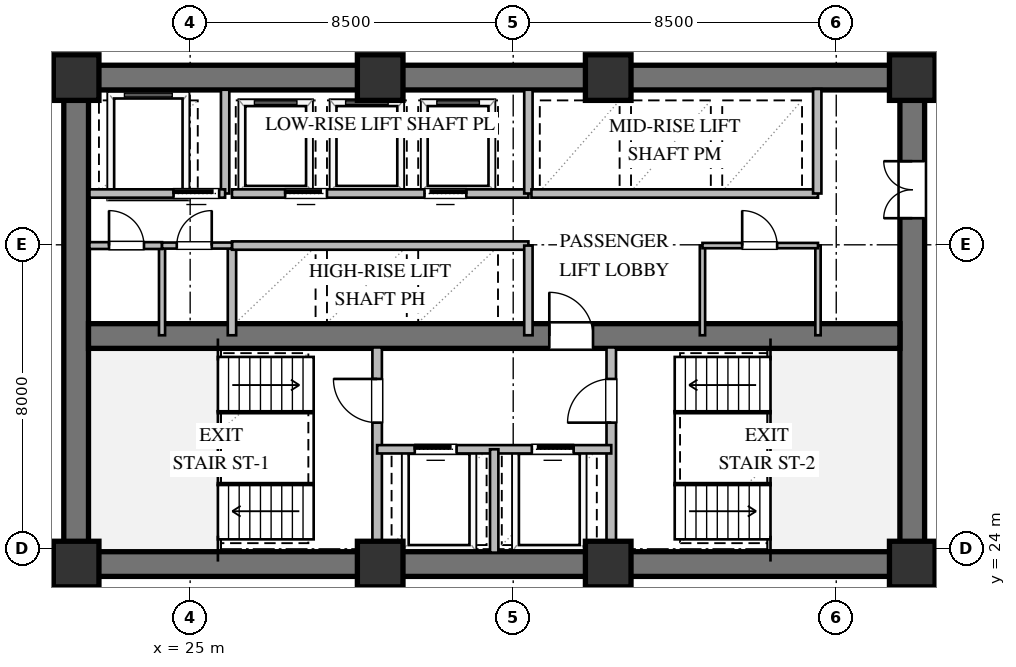
"""IFC4 building model, lengths in metres.
Left out: names, types, materials, properties, quantities, classifications, styles, units other than length and angle.
Written with IfcOpenShell. Run it as: python <this file> out.ifc"""

import sys

from ifc_helpers import new_model, si_unit, direction, frame, frame_2d, origin, origin_2d, place, context, subcontext, project, spatial, rectangle, extrude, element, fill, save


model = new_model("IFC4")
c1 = context("Model", 3, precision=1e-05, world=origin(), true_north=direction((0.0, 1.0)))
c2 = subcontext(c1, "Body", "Model", "MODEL_VIEW")
j1 = project(units=[si_unit("LENGTHUNIT", "METRE"), si_unit("PLANEANGLEUNIT", "RADIAN")], contexts=[c1])
p1 = place(None, origin())
s1 = spatial("IfcSite", under=j1, at=p1, CompositionType="ELEMENT")
p2 = place(p1, origin())
s2 = spatial("IfcBuilding", under=s1, at=p2, CompositionType="ELEMENT")
p3 = place(p2, frame((0.0, 0.0, 56.4)))
s3 = spatial("IfcBuildingStorey", under=s2, at=p3, CompositionType="ELEMENT", Elevation=56.4)
for number, where, z_axis, x_axis in (
    (1, (21.675, 23.6, 0.0), (0.0, 0.0, 1.0), (1.0, 0.0, 0.0)),
    (2, (21.675, 36.4, 0.0), (0.0, 0.0, 1.0), (1.0, 0.0, 0.0)),
):
    element("IfcWall", number, at=place(p3, frame(where, z_axis=z_axis, x_axis=x_axis)), inside=s3, PredefinedType="SHEAR", context=c2, shape_type="SweptSolid", body=[
        extrude(rectangle(XDim=22.65, YDim=0.65, at=frame_2d((11.325, 0.0))), origin(), (0.0, 0.0, 1.0), 3.36),
    ])
p4 = place(p3, frame((22.0, 23.925, 0.0), z_axis=(0.0, 0.0, 1.0), x_axis=(0.0, 1.0, 0.0)))
e3 = element("IfcWall", 3, at=p4, inside=s3, PredefinedType="SHEAR", context=c2, shape_type="SweptSolid", body=[
    extrude(rectangle(XDim=12.15, YDim=0.65, at=frame_2d((6.075, 0.0))), origin(), (0.0, 0.0, 1.0), 3.36),
])
p5 = place(p3, frame((44.0, 23.925, 0.0), z_axis=(0.0, 0.0, 1.0), x_axis=(0.0, 1.0, 0.0)))
e4 = element("IfcWall", 4, at=p5, inside=s3, PredefinedType="SHEAR", context=c2, shape_type="SweptSolid", body=[
    extrude(rectangle(XDim=12.15, YDim=0.65, at=frame_2d((6.075, 0.0))), origin(), (0.0, 0.0, 1.0), 3.36),
])
p6 = place(p5, frame((8.775, 0.0, 0.0)))
e5 = element("IfcOpeningElement", 5, at=p6, cuts=e4, PredefinedType="OPENING", context=c2, shape_type="SweptSolid", body=[
    extrude(rectangle(XDim=1.5, YDim=2.15, at=frame_2d((0.75, 1.075))), frame((0.0, 0.335, 0.0), z_axis=(0.0, -1.0, 0.0), x_axis=(1.0, 0.0, 0.0)), (0.0, 0.0, 1.0), 0.67),
])
p7 = place(p3, frame((22.325, 29.6, 0.0), z_axis=(0.0, 0.0, 1.0), x_axis=(1.0, 0.0, 0.0)))
e6 = element("IfcWall", 6, at=p7, inside=s3, PredefinedType="SHEAR", context=c2, shape_type="SweptSolid", body=[
    extrude(rectangle(XDim=21.35, YDim=0.65, at=frame_2d((10.675, 0.0))), origin(), (0.0, 0.0, 1.0), 3.36),
])
p8 = place(p7, frame((12.125, 0.0, 0.0)))
e7 = element("IfcOpeningElement", 7, at=p8, cuts=e6, PredefinedType="OPENING", context=c2, shape_type="SweptSolid", body=[
    extrude(rectangle(XDim=1.15, YDim=2.1, at=frame_2d((0.575, 1.05))), frame((0.0, 0.335, 0.0), z_axis=(0.0, -1.0, 0.0), x_axis=(1.0, 0.0, 0.0)), (0.0, 0.0, 1.0), 0.67),
])
for number, where, z_axis, x_axis in (
    (8, (22.0, 23.6, 0.0), (0.0, 0.0, 1.0), (1.0, 0.0, 0.0)),
    (9, (30.0, 23.6, 0.0), (0.0, 0.0, 1.0), (1.0, 0.0, 0.0)),
    (10, (36.0, 23.6, 0.0), (0.0, 0.0, 1.0), (1.0, 0.0, 0.0)),
    (11, (44.0, 23.6, 0.0), (0.0, 0.0, 1.0), (1.0, 0.0, 0.0)),
    (12, (44.0, 36.4, 0.0), (0.0, 0.0, 1.0), (1.0, 0.0, 0.0)),
    (13, (36.0, 36.4, 0.0), (0.0, 0.0, 1.0), (1.0, 0.0, 0.0)),
    (14, (30.0, 36.4, 0.0), (0.0, 0.0, 1.0), (1.0, 0.0, 0.0)),
    (15, (22.0, 36.4, 0.0), (0.0, 0.0, 1.0), (1.0, 0.0, 0.0)),
):
    element("IfcColumn", number, at=place(p3, frame(where, z_axis=z_axis, x_axis=x_axis)), inside=s3, PredefinedType="COLUMN", context=c2, shape_type="SweptSolid", body=[
        extrude(rectangle(XDim=1.2, YDim=1.2, at=origin_2d()), origin(), (0.0, 0.0, 1.0), 3.6),
    ])
p9 = place(p3, frame((29.92, 23.9, 0.0), z_axis=(0.0, 0.0, 1.0), x_axis=(0.0, 1.0, 0.0)))
e16 = element("IfcWall", 16, at=p9, inside=s3, PredefinedType="SOLIDWALL", context=c2, shape_type="SweptSolid", body=[
    extrude(rectangle(XDim=5.4, YDim=0.25, at=frame_2d((2.7, 0.0))), origin(), (0.0, 0.0, 1.0), 3.36),
])
p10 = place(p9, frame((3.421, 0.0, 0.0)))
e17 = element("IfcOpeningElement", 17, at=p10, cuts=e16, PredefinedType="OPENING", context=c2, shape_type="SweptSolid", body=[
    extrude(rectangle(XDim=1.15, YDim=2.1, at=frame_2d((0.575, 1.05))), frame((0.0, 0.135, 0.0), z_axis=(0.0, -1.0, 0.0), x_axis=(1.0, 0.0, 0.0)), (0.0, 0.0, 1.0), 0.27),
])
p11 = place(p3, frame((36.08, 23.9, 0.0), z_axis=(0.0, 0.0, 1.0), x_axis=(0.0, 1.0, 0.0)))
e18 = element("IfcWall", 18, at=p11, inside=s3, PredefinedType="SOLIDWALL", context=c2, shape_type="SweptSolid", body=[
    extrude(rectangle(XDim=5.4, YDim=0.25, at=frame_2d((2.7, 0.0))), origin(), (0.0, 0.0, 1.0), 3.36),
])
p12 = place(p11, frame((3.421, 0.0, 0.0)))
e19 = element("IfcOpeningElement", 19, at=p12, cuts=e18, PredefinedType="OPENING", context=c2, shape_type="SweptSolid", body=[
    extrude(rectangle(XDim=1.15, YDim=2.1, at=frame_2d((0.575, 1.05))), frame((0.0, 0.135, 0.0), z_axis=(0.0, -1.0, 0.0), x_axis=(1.0, 0.0, 0.0)), (0.0, 0.0, 1.0), 0.27),
])
p13 = place(p3, frame((29.92, 26.62, 0.0), z_axis=(0.0, 0.0, 1.0), x_axis=(1.0, 0.0, 0.0)))
e20 = element("IfcWall", 20, at=p13, inside=s3, PredefinedType="SOLIDWALL", context=c2, shape_type="SweptSolid", body=[
    extrude(rectangle(XDim=6.16, YDim=0.22, at=frame_2d((3.08, 0.0))), origin(), (0.0, 0.0, 1.0), 3.36),
])
p14 = place(p13, frame((0.99, 0.0, 0.0)))
e21 = element("IfcOpeningElement", 21, at=p14, cuts=e20, PredefinedType="OPENING", context=c2, shape_type="SweptSolid", body=[
    extrude(rectangle(XDim=1.1, YDim=2.1, at=frame_2d((0.55, 1.05))), frame((0.0, 0.12, 0.0), z_axis=(0.0, -1.0, 0.0), x_axis=(1.0, 0.0, 0.0)), (0.0, 0.0, 1.0), 0.24),
])
p15 = place(p13, frame((4.07, 0.0, 0.0)))
e22 = element("IfcOpeningElement", 22, at=p15, cuts=e20, PredefinedType="OPENING", context=c2, shape_type="SweptSolid", body=[
    extrude(rectangle(XDim=1.1, YDim=2.1, at=frame_2d((0.55, 1.05))), frame((0.0, 0.12, 0.0), z_axis=(0.0, -1.0, 0.0), x_axis=(1.0, 0.0, 0.0)), (0.0, 0.0, 1.0), 0.24),
])
p16 = place(p3, frame((33.0, 23.9, 0.0), z_axis=(0.0, 0.0, 1.0), x_axis=(0.0, 1.0, 0.0)))
e23 = element("IfcWall", 23, at=p16, inside=s3, PredefinedType="SOLIDWALL", context=c2, shape_type="SweptSolid", body=[
    extrude(rectangle(XDim=2.72, YDim=0.22, at=frame_2d((1.36, 0.0))), origin(), (0.0, 0.0, 1.0), 3.36),
])
p17 = place(p3, frame((25.92, 33.35, 0.0), z_axis=(0.0, 0.0, 1.0), x_axis=(0.0, 1.0, 0.0)))
e24 = element("IfcWall", 24, at=p17, inside=s3, PredefinedType="SOLIDWALL", context=c2, shape_type="SweptSolid", body=[
    extrude(rectangle(XDim=2.73, YDim=0.22, at=frame_2d((1.365, 0.0))), origin(), (0.0, 0.0, 1.0), 3.36),
])
p18 = place(p3, frame((22.35, 33.35, 0.0), z_axis=(0.0, 0.0, 1.0), x_axis=(1.0, 0.0, 0.0)))
e25 = element("IfcWall", 25, at=p18, inside=s3, PredefinedType="SOLIDWALL", context=c2, shape_type="SweptSolid", body=[
    extrude(rectangle(XDim=3.57, YDim=0.22, at=frame_2d((1.785, 0.0))), origin(), (0.0, 0.0, 1.0), 3.36),
])
p19 = place(p18, frame((2.213, 0.0, 0.0)))
e26 = element("IfcOpeningElement", 26, at=p19, cuts=e25, PredefinedType="OPENING", context=c2, shape_type="SweptSolid", body=[
    extrude(rectangle(XDim=1.2, YDim=2.1, at=frame_2d((0.6, 1.05))), frame((0.0, 0.12, 0.0), z_axis=(0.0, -1.0, 0.0), x_axis=(1.0, 0.0, 0.0)), (0.0, 0.0, 1.0), 0.24),
])
p20 = place(p3, frame((26.1, 29.62, 0.0), z_axis=(0.0, 0.0, 1.0), x_axis=(0.0, 1.0, 0.0)))
e27 = element("IfcWall", 27, at=p20, inside=s3, PredefinedType="SOLIDWALL", context=c2, shape_type="SweptSolid", body=[
    extrude(rectangle(XDim=2.36, YDim=0.22, at=frame_2d((1.18, 0.0))), origin(), (0.0, 0.0, 1.0), 3.36),
])
p21 = place(p3, frame((26.1, 31.98, 0.0), z_axis=(0.0, 0.0, 1.0), x_axis=(1.0, 0.0, 0.0)))
e28 = element("IfcWall", 28, at=p21, inside=s3, PredefinedType="SOLIDWALL", context=c2, shape_type="SweptSolid", body=[
    extrude(rectangle(XDim=7.8, YDim=0.22, at=frame_2d((3.9, 0.0))), origin(), (0.0, 0.0, 1.0), 3.36),
])
p22 = place(p3, frame((33.9, 29.62, 0.0), z_axis=(0.0, 0.0, 1.0), x_axis=(0.0, 1.0, 0.0)))
e29 = element("IfcWall", 29, at=p22, inside=s3, PredefinedType="SOLIDWALL", context=c2, shape_type="SweptSolid", body=[
    extrude(rectangle(XDim=2.36, YDim=0.22, at=frame_2d((1.18, 0.0))), origin(), (0.0, 0.0, 1.0), 3.36),
])
p23 = place(p3, frame((26.1, 33.35, 0.0), z_axis=(0.0, 0.0, 1.0), x_axis=(1.0, 0.0, 0.0)))
e30 = element("IfcWall", 30, at=p23, inside=s3, PredefinedType="SOLIDWALL", context=c2, shape_type="SweptSolid", body=[
    extrude(rectangle(XDim=7.8, YDim=0.22, at=frame_2d((3.9, 0.0))), origin(), (0.0, 0.0, 1.0), 3.36),
])
p24 = place(p23, frame((1.4, 0.0, 0.0)))
e31 = element("IfcOpeningElement", 31, at=p24, cuts=e30, PredefinedType="OPENING", context=c2, shape_type="SweptSolid", body=[
    extrude(rectangle(XDim=1.1, YDim=2.1, at=frame_2d((0.55, 1.05))), frame((0.0, 0.12, 0.0), z_axis=(0.0, -1.0, 0.0), x_axis=(1.0, 0.0, 0.0)), (0.0, 0.0, 1.0), 0.24),
])
p25 = place(p23, frame((5.066, 0.0, 0.0)))
e32 = element("IfcOpeningElement", 32, at=p25, cuts=e30, PredefinedType="OPENING", context=c2, shape_type="SweptSolid", body=[
    extrude(rectangle(XDim=1.1, YDim=2.1, at=frame_2d((0.55, 1.05))), frame((0.0, 0.12, 0.0), z_axis=(0.0, -1.0, 0.0), x_axis=(1.0, 0.0, 0.0)), (0.0, 0.0, 1.0), 0.24),
])
p26 = place(p3, frame((33.9, 33.35, 0.0), z_axis=(0.0, 0.0, 1.0), x_axis=(0.0, 1.0, 0.0)))
e33 = element("IfcWall", 33, at=p26, inside=s3, PredefinedType="SOLIDWALL", context=c2, shape_type="SweptSolid", body=[
    extrude(rectangle(XDim=2.73, YDim=0.22, at=frame_2d((1.365, 0.0))), origin(), (0.0, 0.0, 1.0), 3.36),
])
p27 = place(p3, frame((33.98, 33.35, 0.0), z_axis=(0.0, 0.0, 1.0), x_axis=(1.0, 0.0, 0.0)))
e34 = element("IfcWall", 34, at=p27, inside=s3, PredefinedType="SOLIDWALL", context=c2, shape_type="SweptSolid", body=[
    extrude(rectangle(XDim=7.54, YDim=0.22, at=frame_2d((3.77, 0.0))), origin(), (0.0, 0.0, 1.0), 3.36),
])
p28 = place(p3, frame((41.5, 33.35, 0.0), z_axis=(0.0, 0.0, 1.0), x_axis=(0.0, 1.0, 0.0)))
e35 = element("IfcWall", 35, at=p28, inside=s3, PredefinedType="SOLIDWALL", context=c2, shape_type="SweptSolid", body=[
    extrude(rectangle(XDim=2.75, YDim=0.22, at=frame_2d((1.375, 0.0))), origin(), (0.0, 0.0, 1.0), 3.36),
])
p29 = place(p3, frame((24.26, 29.62, 0.0), z_axis=(0.0, 0.0, 1.0), x_axis=(0.0, 1.0, 0.0)))
e36 = element("IfcWall", 36, at=p29, inside=s3, PredefinedType="PLUMBINGWALL", context=c2, shape_type="SweptSolid", body=[
    extrude(rectangle(XDim=2.36, YDim=0.16, at=frame_2d((1.18, 0.0))), origin(), (0.0, 0.0, 1.0), 3.36),
])
p30 = place(p3, frame((22.35, 31.98, 0.0), z_axis=(0.0, 0.0, 1.0), x_axis=(1.0, 0.0, 0.0)))
e37 = element("IfcWall", 37, at=p30, inside=s3, PredefinedType="PARTITIONING", context=c2, shape_type="SweptSolid", body=[
    extrude(rectangle(XDim=1.91, YDim=0.18, at=frame_2d((0.955, 0.0))), origin(), (0.0, 0.0, 1.0), 3.36),
])
p31 = place(p30, frame((0.515, 0.0, 0.0)))
e38 = element("IfcOpeningElement", 38, at=p31, cuts=e37, PredefinedType="OPENING", context=c2, shape_type="SweptSolid", body=[
    extrude(rectangle(XDim=0.92, YDim=2.1, at=frame_2d((0.46, 1.05))), frame((0.0, 0.1, 0.0), z_axis=(0.0, -1.0, 0.0), x_axis=(1.0, 0.0, 0.0)), (0.0, 0.0, 1.0), 0.2),
])
p32 = place(p3, frame((24.26, 31.98, 0.0), z_axis=(0.0, 0.0, 1.0), x_axis=(1.0, 0.0, 0.0)))
e39 = element("IfcWall", 39, at=p32, inside=s3, PredefinedType="PLUMBINGWALL", context=c2, shape_type="SweptSolid", body=[
    extrude(rectangle(XDim=1.84, YDim=0.16, at=frame_2d((0.92, 0.0))), origin(), (0.0, 0.0, 1.0), 3.36),
])
p33 = place(p32, frame((0.388, 0.0, 0.0)))
e40 = element("IfcOpeningElement", 40, at=p33, cuts=e39, PredefinedType="OPENING", context=c2, shape_type="SweptSolid", body=[
    extrude(rectangle(XDim=0.92, YDim=2.1, at=frame_2d((0.46, 1.05))), frame((0.0, 0.09, 0.0), z_axis=(0.0, -1.0, 0.0), x_axis=(1.0, 0.0, 0.0)), (0.0, 0.0, 1.0), 0.18),
])
for number, where, z_axis, x_axis in (
    (41, (38.48, 29.62, 0.0), (0.0, 0.0, 1.0), (0.0, 1.0, 0.0)),
    (42, (41.52, 29.62, 0.0), (0.0, 0.0, 1.0), (0.0, 1.0, 0.0)),
):
    element("IfcWall", number, at=place(p3, frame(where, z_axis=z_axis, x_axis=x_axis)), inside=s3, PredefinedType="PARTITIONING", context=c2, shape_type="SweptSolid", body=[
        extrude(rectangle(XDim=2.36, YDim=0.14, at=frame_2d((1.18, 0.0))), origin(), (0.0, 0.0, 1.0), 3.36),
    ])
p34 = place(p3, frame((38.48, 31.98, 0.0), z_axis=(0.0, 0.0, 1.0), x_axis=(1.0, 0.0, 0.0)))
e43 = element("IfcWall", 43, at=p34, inside=s3, PredefinedType="PARTITIONING", context=c2, shape_type="SweptSolid", body=[
    extrude(rectangle(XDim=3.04, YDim=0.14, at=frame_2d((1.52, 0.0))), origin(), (0.0, 0.0, 1.0), 3.36),
])
p35 = place(p34, frame((1.045, 0.0, 0.0)))
e44 = element("IfcOpeningElement", 44, at=p35, cuts=e43, PredefinedType="OPENING", context=c2, shape_type="SweptSolid", body=[
    extrude(rectangle(XDim=0.92, YDim=2.1, at=frame_2d((0.46, 1.05))), frame((0.0, 0.08, 0.0), z_axis=(0.0, -1.0, 0.0), x_axis=(1.0, 0.0, 0.0)), (0.0, 0.0, 1.0), 0.16),
])
p36 = place(p10, origin())
e45 = element("IfcDoor", 45, at=p36, inside=s3, OperationType="SINGLE_SWING_RIGHT", PredefinedType="DOOR", context=c2, shape_type="SweptSolid", body=[
    extrude(rectangle(XDim=1.15, YDim=2.1, at=frame_2d((0.575, 1.05))), frame((0.0, 0.025, 0.0), z_axis=(0.0, -1.0, 0.0), x_axis=(1.0, 0.0, 0.0)), (0.0, 0.0, 1.0), 0.05),
])
fill(e17, e45)
p37 = place(p12, origin())
e46 = element("IfcDoor", 46, at=p37, inside=s3, OperationType="SINGLE_SWING_LEFT", PredefinedType="DOOR", context=c2, shape_type="SweptSolid", body=[
    extrude(rectangle(XDim=1.15, YDim=2.1, at=frame_2d((0.575, 1.05))), frame((0.0, 0.025, 0.0), z_axis=(0.0, -1.0, 0.0), x_axis=(1.0, 0.0, 0.0)), (0.0, 0.0, 1.0), 0.05),
])
fill(e19, e46)
p38 = place(p14, origin())
e47 = element("IfcDoor", 47, at=p38, inside=s3, OperationType="SLIDING_TO_LEFT", PredefinedType="DOOR", context=c2, shape_type="SweptSolid", body=[
    extrude(rectangle(XDim=1.1, YDim=2.1, at=frame_2d((0.55, 1.05))), frame((0.0, 0.025, 0.0), z_axis=(0.0, -1.0, 0.0), x_axis=(1.0, 0.0, 0.0)), (0.0, 0.0, 1.0), 0.05),
])
fill(e21, e47)
p39 = place(p15, origin())
e48 = element("IfcDoor", 48, at=p39, inside=s3, OperationType="SLIDING_TO_RIGHT", PredefinedType="DOOR", context=c2, shape_type="SweptSolid", body=[
    extrude(rectangle(XDim=1.1, YDim=2.1, at=frame_2d((0.55, 1.05))), frame((0.0, 0.025, 0.0), z_axis=(0.0, -1.0, 0.0), x_axis=(1.0, 0.0, 0.0)), (0.0, 0.0, 1.0), 0.05),
])
fill(e22, e48)
p40 = place(p8, origin())
e49 = element("IfcDoor", 49, at=p40, inside=s3, OperationType="SINGLE_SWING_LEFT", PredefinedType="DOOR", context=c2, shape_type="SweptSolid", body=[
    extrude(rectangle(XDim=1.15, YDim=2.1, at=frame_2d((0.575, 1.05))), frame((0.0, 0.025, 0.0), z_axis=(0.0, -1.0, 0.0), x_axis=(1.0, 0.0, 0.0)), (0.0, 0.0, 1.0), 0.05),
])
fill(e7, e49)
p41 = place(p6, origin())
e50 = element("IfcDoor", 50, at=p41, inside=s3, OperationType="DOUBLE_DOOR_SINGLE_SWING", PredefinedType="DOOR", context=c2, shape_type="SweptSolid", body=[
    extrude(rectangle(XDim=1.5, YDim=2.15, at=frame_2d((0.75, 1.075))), frame((0.0, 0.025, 0.0), z_axis=(0.0, -1.0, 0.0), x_axis=(1.0, 0.0, 0.0)), (0.0, 0.0, 1.0), 0.05),
])
fill(e5, e50)
p42 = place(p19, origin())
e51 = element("IfcDoor", 51, at=p42, inside=s3, OperationType="SLIDING_TO_LEFT", PredefinedType="DOOR", context=c2, shape_type="SweptSolid", body=[
    extrude(rectangle(XDim=1.2, YDim=2.1, at=frame_2d((0.6, 1.05))), frame((0.0, 0.025, 0.0), z_axis=(0.0, -1.0, 0.0), x_axis=(1.0, 0.0, 0.0)), (0.0, 0.0, 1.0), 0.05),
])
fill(e26, e51)
p43 = place(p24, origin())
e52 = element("IfcDoor", 52, at=p43, inside=s3, OperationType="SLIDING_TO_LEFT", PredefinedType="DOOR", context=c2, shape_type="SweptSolid", body=[
    extrude(rectangle(XDim=1.1, YDim=2.1, at=frame_2d((0.55, 1.05))), frame((0.0, 0.025, 0.0), z_axis=(0.0, -1.0, 0.0), x_axis=(1.0, 0.0, 0.0)), (0.0, 0.0, 1.0), 0.05),
])
fill(e31, e52)
p44 = place(p25, origin())
e53 = element("IfcDoor", 53, at=p44, inside=s3, OperationType="SLIDING_TO_RIGHT", PredefinedType="DOOR", context=c2, shape_type="SweptSolid", body=[
    extrude(rectangle(XDim=1.1, YDim=2.1, at=frame_2d((0.55, 1.05))), frame((0.0, 0.025, 0.0), z_axis=(0.0, -1.0, 0.0), x_axis=(1.0, 0.0, 0.0)), (0.0, 0.0, 1.0), 0.05),
])
fill(e32, e53)
p45 = place(p31, origin())
e54 = element("IfcDoor", 54, at=p45, inside=s3, OperationType="SINGLE_SWING_LEFT", PredefinedType="DOOR", context=c2, shape_type="SweptSolid", body=[
    extrude(rectangle(XDim=0.92, YDim=2.1, at=frame_2d((0.46, 1.05))), frame((0.0, 0.025, 0.0), z_axis=(0.0, -1.0, 0.0), x_axis=(1.0, 0.0, 0.0)), (0.0, 0.0, 1.0), 0.05),
])
fill(e38, e54)
p46 = place(p33, origin())
e55 = element("IfcDoor", 55, at=p46, inside=s3, OperationType="SINGLE_SWING_RIGHT", PredefinedType="DOOR", context=c2, shape_type="SweptSolid", body=[
    extrude(rectangle(XDim=0.92, YDim=2.1, at=frame_2d((0.46, 1.05))), frame((0.0, 0.025, 0.0), z_axis=(0.0, -1.0, 0.0), x_axis=(1.0, 0.0, 0.0)), (0.0, 0.0, 1.0), 0.05),
])
fill(e40, e55)
p47 = place(p35, origin())
e56 = element("IfcDoor", 56, at=p47, inside=s3, OperationType="SINGLE_SWING_LEFT", PredefinedType="DOOR", context=c2, shape_type="SweptSolid", body=[
    extrude(rectangle(XDim=0.92, YDim=2.1, at=frame_2d((0.46, 1.05))), frame((0.0, 0.025, 0.0), z_axis=(0.0, -1.0, 0.0), x_axis=(1.0, 0.0, 0.0)), (0.0, 0.0, 1.0), 0.05),
])
fill(e44, e56)
save(model, sys.argv[1])
